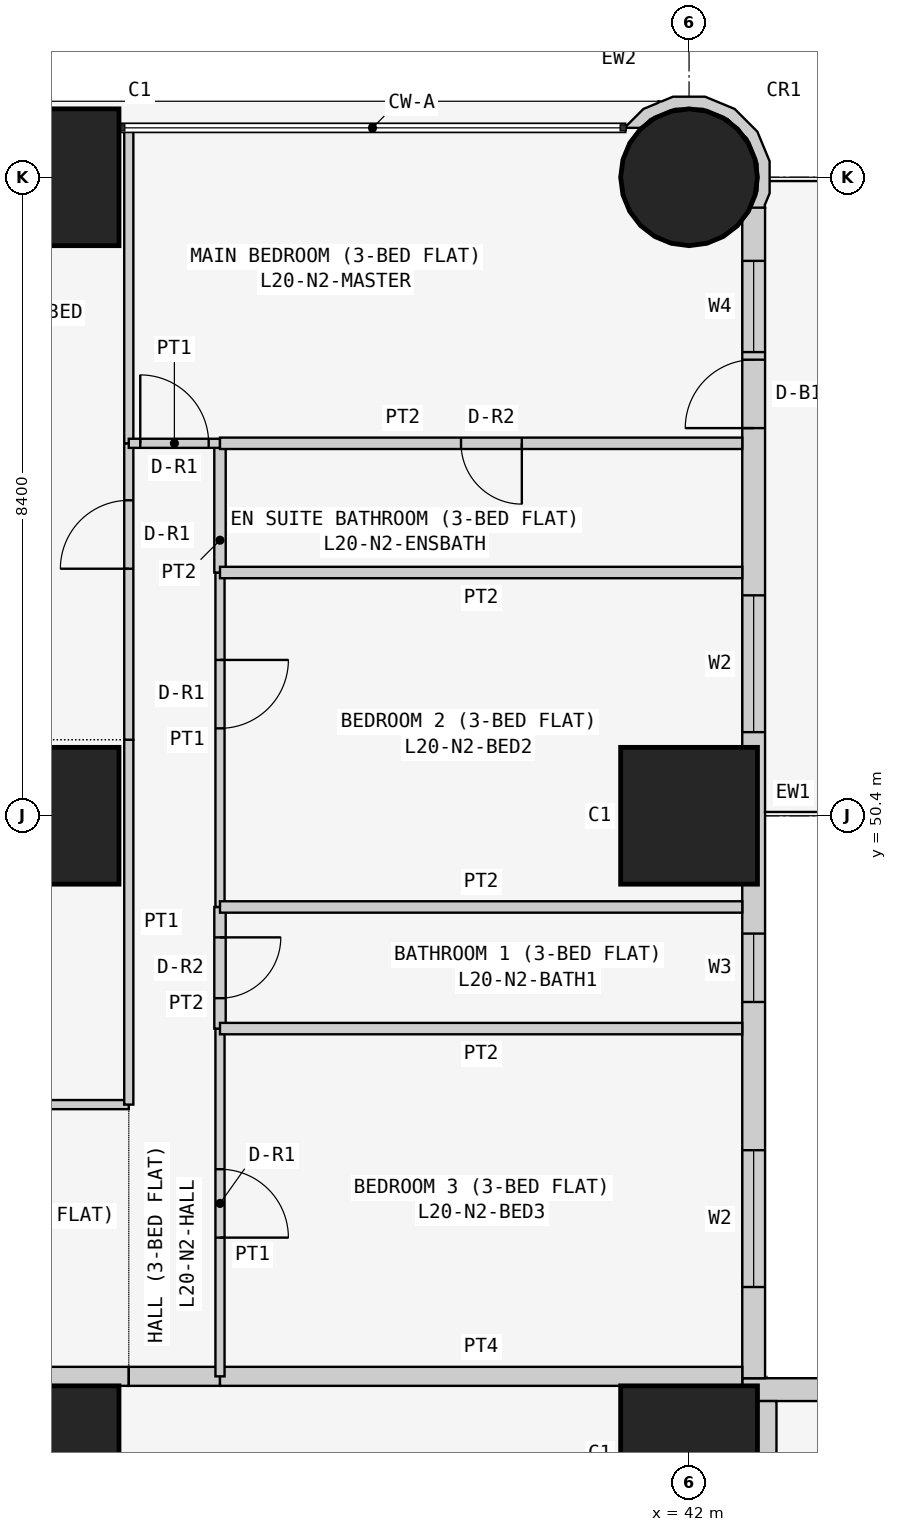
"""IFC4 building model, lengths in metres.
Left out: names, types, materials, properties, quantities, classifications, styles, units other than length and angle.
Written with IfcOpenShell. Run it as: python <this file> out.ifc"""

import sys

from ifc_helpers import new_model, si_unit, direction, frame, frame_2d, origin, origin_2d, place, context, subcontext, project, spatial, polyline, rectangle, circle, outline, extrude, element, fill, save


model = new_model("IFC4")
c1 = context("Model", 3, precision=1e-05, world=origin(), true_north=direction((0.0, 1.0)))
c2 = subcontext(c1, "Body", "Model", "MODEL_VIEW")
j1 = project(units=[si_unit("LENGTHUNIT", "METRE"), si_unit("PLANEANGLEUNIT", "RADIAN")], contexts=[c1])
p1 = place(None, origin())
s1 = spatial("IfcSite", under=j1, at=p1, CompositionType="ELEMENT")
p2 = place(p1, origin())
s2 = spatial("IfcBuilding", under=s1, at=p2, CompositionType="ELEMENT")
p3 = place(p2, frame((0.0, 0.0, 81.3)))
s3 = spatial("IfcBuildingStorey", under=s2, at=p3, CompositionType="ELEMENT", Elevation=81.3)
for number, where, z_axis, x_axis in (
    (1, (33.6, 42.0, 0.0), (0.0, 0.0, 1.0), (1.0, 0.0, 0.0)),
    (2, (33.6, 50.4, 0.0), (0.0, 0.0, 1.0), (1.0, 0.0, 0.0)),
    (3, (33.6, 58.8, 0.0), (0.0, 0.0, 1.0), (1.0, 0.0, 0.0)),
    (4, (42.0, 42.0, 0.0), (0.0, 0.0, 1.0), (1.0, 0.0, 0.0)),
    (5, (42.0, 50.4, 0.0), (0.0, 0.0, 1.0), (1.0, 0.0, 0.0)),
):
    element("IfcColumn", number, at=place(p3, frame(where, z_axis=z_axis, x_axis=x_axis)), inside=s3, PredefinedType="COLUMN", context=c2, shape_type="SweptSolid", body=[
        extrude(rectangle(XDim=1.8, YDim=1.8, at=origin_2d()), origin(), (0.0, 0.0, 1.0), 3.6),
    ])
p4 = place(p3, frame((42.0, 58.8, 0.0), z_axis=(0.0, 0.0, 1.0), x_axis=(1.0, 0.0, 0.0)))
e6 = element("IfcColumn", 6, at=p4, inside=s3, PredefinedType="COLUMN", context=c2, shape_type="SweptSolid", body=[
    extrude(circle(Radius=0.9, at=origin_2d()), origin(), (0.0, 0.0, 1.0), 3.6),
])
p5 = place(p3, frame((58.4, 42.85, 0.0), z_axis=(0.0, 0.0, 1.0), x_axis=(-1.0, 0.0, 0.0)))
e7 = element("IfcWall", 7, at=p5, inside=s3, PredefinedType="SOLIDWALL", context=c2, shape_type="SweptSolid", body=[
    extrude(rectangle(XDim=15.7, YDim=0.3, at=frame_2d((7.85, 0.0))), origin(), (0.0, 0.0, 1.0), 3.45),
])
p6 = place(p5, frame((12.4, 0.0, 0.9)))
e8 = element("IfcOpeningElement", 8, at=p6, cuts=e7, PredefinedType="OPENING", context=c2, shape_type="SweptSolid", body=[
    extrude(rectangle(XDim=1.8, YDim=1.5, at=frame_2d((0.9, 0.75))), frame((0.0, 0.16, 0.0), z_axis=(0.0, -1.0, 0.0), x_axis=(1.0, 0.0, 0.0)), (0.0, 0.0, 1.0), 0.32),
])
p7 = place(p5, frame((9.55, 0.0, 1.5)))
e9 = element("IfcOpeningElement", 9, at=p7, cuts=e7, PredefinedType="OPENING", context=c2, shape_type="SweptSolid", body=[
    extrude(rectangle(XDim=0.9, YDim=0.7, at=frame_2d((0.45, 0.35))), frame((0.0, 0.16, 0.0), z_axis=(0.0, -1.0, 0.0), x_axis=(1.0, 0.0, 0.0)), (0.0, 0.0, 1.0), 0.32),
])
p8 = place(p5, frame((5.1, 0.0, 0.9)))
e10 = element("IfcOpeningElement", 10, at=p8, cuts=e7, PredefinedType="OPENING", context=c2, shape_type="SweptSolid", body=[
    extrude(rectangle(XDim=1.8, YDim=1.5, at=frame_2d((0.9, 0.75))), frame((0.0, 0.16, 0.0), z_axis=(0.0, -1.0, 0.0), x_axis=(1.0, 0.0, 0.0)), (0.0, 0.0, 1.0), 0.32),
])
p9 = place(p5, frame((2.0, 0.0, 0.0)))
e11 = element("IfcOpeningElement", 11, at=p9, cuts=e7, PredefinedType="OPENING", context=c2, shape_type="SweptSolid", body=[
    extrude(rectangle(XDim=0.9, YDim=2.4, at=frame_2d((0.45, 1.2))), frame((0.0, 0.16, 0.0), z_axis=(0.0, -1.0, 0.0), x_axis=(1.0, 0.0, 0.0)), (0.0, 0.0, 1.0), 0.32),
])
p10 = place(p5, frame((0.7, 0.0, 0.9)))
e12 = element("IfcOpeningElement", 12, at=p10, cuts=e7, PredefinedType="OPENING", context=c2, shape_type="SweptSolid", body=[
    extrude(rectangle(XDim=1.2, YDim=1.5, at=frame_2d((0.6, 0.75))), frame((0.0, 0.16, 0.0), z_axis=(0.0, -1.0, 0.0), x_axis=(1.0, 0.0, 0.0)), (0.0, 0.0, 1.0), 0.32),
])
p11 = place(p3, frame((42.85, 43.0, 0.0), z_axis=(0.0, 0.0, 1.0), x_axis=(0.0, 1.0, 0.0)))
e13 = element("IfcWall", 13, at=p11, inside=s3, PredefinedType="SOLIDWALL", context=c2, shape_type="SweptSolid", body=[
    extrude(rectangle(XDim=15.4, YDim=0.3, at=frame_2d((7.7, 0.0))), origin(), (0.0, 0.0, 1.0), 3.45),
])
p12 = place(p11, frame((1.2, 0.0, 0.9)))
e14 = element("IfcOpeningElement", 14, at=p12, cuts=e13, PredefinedType="OPENING", context=c2, shape_type="SweptSolid", body=[
    extrude(rectangle(XDim=1.8, YDim=1.5, at=frame_2d((0.9, 0.75))), frame((0.0, 0.16, 0.0), z_axis=(0.0, -1.0, 0.0), x_axis=(1.0, 0.0, 0.0)), (0.0, 0.0, 1.0), 0.32),
])
p13 = place(p11, frame((4.95, 0.0, 1.5)))
e15 = element("IfcOpeningElement", 15, at=p13, cuts=e13, PredefinedType="OPENING", context=c2, shape_type="SweptSolid", body=[
    extrude(rectangle(XDim=0.9, YDim=0.7, at=frame_2d((0.45, 0.35))), frame((0.0, 0.16, 0.0), z_axis=(0.0, -1.0, 0.0), x_axis=(1.0, 0.0, 0.0)), (0.0, 0.0, 1.0), 0.32),
])
p14 = place(p11, frame((8.5, 0.0, 0.9)))
e16 = element("IfcOpeningElement", 16, at=p14, cuts=e13, PredefinedType="OPENING", context=c2, shape_type="SweptSolid", body=[
    extrude(rectangle(XDim=1.8, YDim=1.5, at=frame_2d((0.9, 0.75))), frame((0.0, 0.16, 0.0), z_axis=(0.0, -1.0, 0.0), x_axis=(1.0, 0.0, 0.0)), (0.0, 0.0, 1.0), 0.32),
])
p15 = place(p11, frame((12.5, 0.0, 0.0)))
e17 = element("IfcOpeningElement", 17, at=p15, cuts=e13, PredefinedType="OPENING", context=c2, shape_type="SweptSolid", body=[
    extrude(rectangle(XDim=0.9, YDim=2.4, at=frame_2d((0.45, 1.2))), frame((0.0, 0.16, 0.0), z_axis=(0.0, -1.0, 0.0), x_axis=(1.0, 0.0, 0.0)), (0.0, 0.0, 1.0), 0.32),
])
p16 = place(p11, frame((13.5, 0.0, 0.9)))
e18 = element("IfcOpeningElement", 18, at=p16, cuts=e13, PredefinedType="OPENING", context=c2, shape_type="SweptSolid", body=[
    extrude(rectangle(XDim=1.2, YDim=1.5, at=frame_2d((0.6, 0.75))), frame((0.0, 0.16, 0.0), z_axis=(0.0, -1.0, 0.0), x_axis=(1.0, 0.0, 0.0)), (0.0, 0.0, 1.0), 0.32),
])
p17 = place(p3, frame((42.91, 58.436, 0.0), z_axis=(0.0, 0.0, 1.0), x_axis=(0.377204953059, 0.926129809145, 0.0)))
e19 = element("IfcWall", 19, at=p17, inside=s3, PredefinedType="SOLIDWALL", context=c2, shape_type="SweptSolid", body=[
    extrude(outline(polyline([(0.769, 1.728), (0.75, 1.723), (0.6, 1.875), (0.295, 2.004), (0.281, 1.998), (0.36, 1.803), (0.509, 1.741), (0.761, 1.486), (0.896, 1.154), (0.894, 0.795), (0.755, 0.465), (0.5, 0.213), (0.168, 0.078), (-0.1, 0.08), (0.001, -0.097), (0.03, -0.08), (0.198, -0.081), (0.589, 0.078), (0.889, 0.374), (1.052, 0.763), (1.055, 1.185), (0.896, 1.575), (0.778, 1.695), (0.769, 1.728)])), origin(), (0.0, 0.0, 1.0), 3.45),
])
p18 = place(p3, frame((29.4, 43.025, 0.0), z_axis=(0.0, 0.0, 1.0), x_axis=(1.0, 0.0, 0.0)))
e20 = element("IfcWall", 20, at=p18, inside=s3, PredefinedType="PARTITIONING", context=c2, shape_type="SweptSolid", body=[
    extrude(rectangle(XDim=5.229, YDim=0.25, at=frame_2d((2.615, 0.0))), origin(), (0.0, 0.0, 1.0), 3.45),
])
p19 = place(p18, frame((2.1, 0.0, 0.0)))
e21 = element("IfcOpeningElement", 21, at=p19, cuts=e20, PredefinedType="OPENING", context=c2, shape_type="SweptSolid", body=[
    extrude(rectangle(XDim=1.0, YDim=2.1, at=frame_2d((0.5, 1.05))), frame((0.0, 0.135, 0.0), z_axis=(0.0, -1.0, 0.0), x_axis=(1.0, 0.0, 0.0)), (0.0, 0.0, 1.0), 0.27),
])
p20 = place(p3, frame((34.629, 43.025, 0.0), z_axis=(0.0, 0.0, 1.0), x_axis=(1.0, 0.0, 0.0)))
e22 = element("IfcWall", 22, at=p20, inside=s3, PredefinedType="PARTITIONING", context=c2, shape_type="SweptSolid", body=[
    extrude(rectangle(XDim=1.2, YDim=0.25, at=frame_2d((0.6, 0.0))), origin(), (0.0, 0.0, 1.0), 3.45),
])
for number, where, z_axis, x_axis in (
    (23, (35.829, 43.025, 0.0), (0.0, 0.0, 1.0), (1.0, 0.0, 0.0)),
    (24, (43.025, 42.7, 0.0), (0.0, 0.0, 1.0), (0.0, -1.0, 0.0)),
):
    element("IfcWall", number, at=place(p3, frame(where, z_axis=z_axis, x_axis=x_axis)), inside=s3, PredefinedType="PARTITIONING", context=c2, shape_type="SweptSolid", body=[
        extrude(rectangle(XDim=6.871, YDim=0.25, at=frame_2d((3.436, 0.0))), origin(), (0.0, 0.0, 1.0), 3.45),
    ])
p21 = place(p3, frame((29.4, 46.6, 0.0), z_axis=(0.0, 0.0, 1.0), x_axis=(1.0, 0.0, 0.0)))
e25 = element("IfcWall", 25, at=p21, inside=s3, PredefinedType="PARTITIONING", context=c2, shape_type="SweptSolid", body=[
    extrude(rectangle(XDim=5.229, YDim=0.12, at=frame_2d((2.615, 0.0))), origin(), (0.0, 0.0, 1.0), 3.45),
])
p22 = place(p21, frame((1.05, 0.0, 0.0)))
e26 = element("IfcOpeningElement", 26, at=p22, cuts=e25, PredefinedType="OPENING", context=c2, shape_type="SweptSolid", body=[
    extrude(rectangle(XDim=0.9, YDim=2.1, at=frame_2d((0.45, 1.05))), frame((0.0, 0.07, 0.0), z_axis=(0.0, -1.0, 0.0), x_axis=(1.0, 0.0, 0.0)), (0.0, 0.0, 1.0), 0.14),
])
p23 = place(p3, frame((34.629, 51.4, 0.0), z_axis=(0.0, 0.0, 1.0), x_axis=(0.0, -1.0, 0.0)))
e27 = element("IfcWall", 27, at=p23, inside=s3, PredefinedType="PARTITIONING", context=c2, shape_type="SweptSolid", body=[
    extrude(rectangle(XDim=4.8, YDim=0.12, at=frame_2d((2.4, 0.0))), origin(), (0.0, 0.0, 1.0), 3.45),
])
p24 = place(p3, frame((34.629, 55.3, 0.0), z_axis=(0.0, 0.0, 1.0), x_axis=(0.0, -1.0, 0.0)))
e28 = element("IfcWall", 28, at=p24, inside=s3, PredefinedType="PARTITIONING", context=c2, shape_type="SweptSolid", body=[
    extrude(rectangle(XDim=3.9, YDim=0.12, at=frame_2d((1.95, 0.0))), origin(), (0.0, 0.0, 1.0), 3.45),
])
p25 = place(p24, frame((0.75, 0.0, 0.0)))
e29 = element("IfcOpeningElement", 29, at=p25, cuts=e28, PredefinedType="OPENING", context=c2, shape_type="SweptSolid", body=[
    extrude(rectangle(XDim=0.9, YDim=2.1, at=frame_2d((0.45, 1.05))), frame((0.0, 0.07, 0.0), z_axis=(0.0, -1.0, 0.0), x_axis=(1.0, 0.0, 0.0)), (0.0, 0.0, 1.0), 0.14),
])
p26 = place(p3, frame((34.629, 59.45, 0.0), z_axis=(0.0, 0.0, 1.0), x_axis=(0.0, -1.0, 0.0)))
e30 = element("IfcWall", 30, at=p26, inside=s3, PredefinedType="PARTITIONING", context=c2, shape_type="SweptSolid", body=[
    extrude(rectangle(XDim=4.15, YDim=0.12, at=frame_2d((2.075, 0.0))), origin(), (0.0, 0.0, 1.0), 3.45),
])
p27 = place(p3, frame((35.829, 47.6, 0.0), z_axis=(0.0, 0.0, 1.0), x_axis=(0.0, -1.0, 0.0)))
e31 = element("IfcWall", 31, at=p27, inside=s3, PredefinedType="PARTITIONING", context=c2, shape_type="SweptSolid", body=[
    extrude(rectangle(XDim=4.575, YDim=0.12, at=frame_2d((2.288, 0.0))), origin(), (0.0, 0.0, 1.0), 3.45),
])
p28 = place(p27, frame((1.85, 0.0, 0.0)))
e32 = element("IfcOpeningElement", 32, at=p28, cuts=e31, PredefinedType="OPENING", context=c2, shape_type="SweptSolid", body=[
    extrude(rectangle(XDim=0.9, YDim=2.1, at=frame_2d((0.45, 1.05))), frame((0.0, 0.07, 0.0), z_axis=(0.0, -1.0, 0.0), x_axis=(1.0, 0.0, 0.0)), (0.0, 0.0, 1.0), 0.14),
])
p29 = place(p3, frame((35.829, 49.2, 0.0), z_axis=(0.0, 0.0, 1.0), x_axis=(0.0, -1.0, 0.0)))
e33 = element("IfcWall", 33, at=p29, inside=s3, PredefinedType="PARTITIONING", context=c2, shape_type="SweptSolid", body=[
    extrude(rectangle(XDim=1.6, YDim=0.15, at=frame_2d((0.8, 0.0))), origin(), (0.0, 0.0, 1.0), 3.45),
])
p30 = place(p29, frame((0.4, 0.0, 0.0)))
e34 = element("IfcOpeningElement", 34, at=p30, cuts=e33, PredefinedType="OPENING", context=c2, shape_type="SweptSolid", body=[
    extrude(rectangle(XDim=0.8, YDim=2.1, at=frame_2d((0.4, 1.05))), frame((0.0, 0.085, 0.0), z_axis=(0.0, -1.0, 0.0), x_axis=(1.0, 0.0, 0.0)), (0.0, 0.0, 1.0), 0.17),
])
p31 = place(p3, frame((35.829, 53.6, 0.0), z_axis=(0.0, 0.0, 1.0), x_axis=(0.0, -1.0, 0.0)))
e35 = element("IfcWall", 35, at=p31, inside=s3, PredefinedType="PARTITIONING", context=c2, shape_type="SweptSolid", body=[
    extrude(rectangle(XDim=4.4, YDim=0.12, at=frame_2d((2.2, 0.0))), origin(), (0.0, 0.0, 1.0), 3.45),
])
p32 = place(p31, frame((1.15, 0.0, 0.0)))
e36 = element("IfcOpeningElement", 36, at=p32, cuts=e35, PredefinedType="OPENING", context=c2, shape_type="SweptSolid", body=[
    extrude(rectangle(XDim=0.9, YDim=2.1, at=frame_2d((0.45, 1.05))), frame((0.0, 0.07, 0.0), z_axis=(0.0, -1.0, 0.0), x_axis=(1.0, 0.0, 0.0)), (0.0, 0.0, 1.0), 0.14),
])
p33 = place(p3, frame((35.829, 55.3, 0.0), z_axis=(0.0, 0.0, 1.0), x_axis=(0.0, -1.0, 0.0)))
e37 = element("IfcWall", 37, at=p33, inside=s3, PredefinedType="PARTITIONING", context=c2, shape_type="SweptSolid", body=[
    extrude(rectangle(XDim=1.7, YDim=0.15, at=frame_2d((0.85, 0.0))), origin(), (0.0, 0.0, 1.0), 3.45),
])
p34 = place(p3, frame((34.629, 55.3, 0.0), z_axis=(0.0, 0.0, 1.0), x_axis=(1.0, 0.0, 0.0)))
e38 = element("IfcWall", 38, at=p34, inside=s3, PredefinedType="PARTITIONING", context=c2, shape_type="SweptSolid", body=[
    extrude(rectangle(XDim=1.2, YDim=0.12, at=frame_2d((0.6, 0.0))), origin(), (0.0, 0.0, 1.0), 3.45),
])
p35 = place(p34, frame((0.151, 0.0, 0.0)))
e39 = element("IfcOpeningElement", 39, at=p35, cuts=e38, PredefinedType="OPENING", context=c2, shape_type="SweptSolid", body=[
    extrude(rectangle(XDim=0.9, YDim=2.1, at=frame_2d((0.45, 1.05))), frame((0.0, 0.07, 0.0), z_axis=(0.0, -1.0, 0.0), x_axis=(1.0, 0.0, 0.0)), (0.0, 0.0, 1.0), 0.14),
])
for number, where, z_axis, x_axis in (
    (40, (35.829, 47.6, 0.0), (0.0, 0.0, 1.0), (1.0, 0.0, 0.0)),
    (41, (35.829, 49.2, 0.0), (0.0, 0.0, 1.0), (1.0, 0.0, 0.0)),
    (42, (35.829, 53.6, 0.0), (0.0, 0.0, 1.0), (1.0, 0.0, 0.0)),
):
    element("IfcWall", number, at=place(p3, frame(where, z_axis=z_axis, x_axis=x_axis)), inside=s3, PredefinedType="PARTITIONING", context=c2, shape_type="SweptSolid", body=[
        extrude(rectangle(XDim=6.871, YDim=0.15, at=frame_2d((3.436, 0.0))), origin(), (0.0, 0.0, 1.0), 3.45),
    ])
p36 = place(p3, frame((35.829, 55.3, 0.0), z_axis=(0.0, 0.0, 1.0), x_axis=(1.0, 0.0, 0.0)))
e43 = element("IfcWall", 43, at=p36, inside=s3, PredefinedType="PARTITIONING", context=c2, shape_type="SweptSolid", body=[
    extrude(rectangle(XDim=6.871, YDim=0.15, at=frame_2d((3.436, 0.0))), origin(), (0.0, 0.0, 1.0), 3.45),
])
p37 = place(p36, frame((3.171, 0.0, 0.0)))
e44 = element("IfcOpeningElement", 44, at=p37, cuts=e43, PredefinedType="OPENING", context=c2, shape_type="SweptSolid", body=[
    extrude(rectangle(XDim=0.8, YDim=2.1, at=frame_2d((0.4, 1.05))), frame((0.0, 0.085, 0.0), z_axis=(0.0, -1.0, 0.0), x_axis=(1.0, 0.0, 0.0)), (0.0, 0.0, 1.0), 0.17),
])
p38 = place(p12, origin())
e45 = element("IfcWindow", 45, at=p38, inside=s3, PartitioningType="SINGLE_PANEL", PredefinedType="WINDOW", context=c2, shape_type="SweptSolid", body=[
    extrude(rectangle(XDim=1.8, YDim=1.5, at=frame_2d((0.9, 0.75))), frame((0.0, 0.03, 0.0), z_axis=(0.0, -1.0, 0.0), x_axis=(1.0, 0.0, 0.0)), (0.0, 0.0, 1.0), 0.06),
])
fill(e14, e45)
p39 = place(p13, origin())
e46 = element("IfcWindow", 46, at=p39, inside=s3, PartitioningType="SINGLE_PANEL", PredefinedType="WINDOW", context=c2, shape_type="SweptSolid", body=[
    extrude(rectangle(XDim=0.9, YDim=0.7, at=frame_2d((0.45, 0.35))), frame((0.0, 0.03, 0.0), z_axis=(0.0, -1.0, 0.0), x_axis=(1.0, 0.0, 0.0)), (0.0, 0.0, 1.0), 0.06),
])
fill(e15, e46)
p40 = place(p14, origin())
e47 = element("IfcWindow", 47, at=p40, inside=s3, PartitioningType="SINGLE_PANEL", PredefinedType="WINDOW", context=c2, shape_type="SweptSolid", body=[
    extrude(rectangle(XDim=1.8, YDim=1.5, at=frame_2d((0.9, 0.75))), frame((0.0, 0.03, 0.0), z_axis=(0.0, -1.0, 0.0), x_axis=(1.0, 0.0, 0.0)), (0.0, 0.0, 1.0), 0.06),
])
fill(e16, e47)
p41 = place(p15, origin())
e48 = element("IfcDoor", 48, at=p41, inside=s3, OperationType="SINGLE_SWING_LEFT", PredefinedType="DOOR", context=c2, shape_type="SweptSolid", body=[
    extrude(rectangle(XDim=0.9, YDim=2.4, at=frame_2d((0.45, 1.2))), frame((0.0, 0.025, 0.0), z_axis=(0.0, -1.0, 0.0), x_axis=(1.0, 0.0, 0.0)), (0.0, 0.0, 1.0), 0.05),
])
fill(e17, e48)
p42 = place(p16, origin())
e49 = element("IfcWindow", 49, at=p42, inside=s3, PartitioningType="SINGLE_PANEL", PredefinedType="WINDOW", context=c2, shape_type="SweptSolid", body=[
    extrude(rectangle(XDim=1.2, YDim=1.5, at=frame_2d((0.6, 0.75))), frame((0.0, 0.03, 0.0), z_axis=(0.0, -1.0, 0.0), x_axis=(1.0, 0.0, 0.0)), (0.0, 0.0, 1.0), 0.06),
])
fill(e18, e49)
p43 = place(p25, frame((0.9, 0.0, 0.0), z_axis=(0.0, 0.0, 1.0), x_axis=(-1.0, 0.0, 0.0)))
e50 = element("IfcDoor", 50, at=p43, inside=s3, OperationType="SINGLE_SWING_LEFT", PredefinedType="DOOR", context=c2, shape_type="SweptSolid", body=[
    extrude(rectangle(XDim=0.9, YDim=2.1, at=frame_2d((0.45, 1.05))), frame((0.0, 0.025, 0.0), z_axis=(0.0, -1.0, 0.0), x_axis=(1.0, 0.0, 0.0)), (0.0, 0.0, 1.0), 0.05),
])
fill(e29, e50)
p44 = place(p28, origin())
e51 = element("IfcDoor", 51, at=p44, inside=s3, OperationType="SINGLE_SWING_RIGHT", PredefinedType="DOOR", context=c2, shape_type="SweptSolid", body=[
    extrude(rectangle(XDim=0.9, YDim=2.1, at=frame_2d((0.45, 1.05))), frame((0.0, 0.025, 0.0), z_axis=(0.0, -1.0, 0.0), x_axis=(1.0, 0.0, 0.0)), (0.0, 0.0, 1.0), 0.05),
])
fill(e32, e51)
p45 = place(p30, origin())
e52 = element("IfcDoor", 52, at=p45, inside=s3, OperationType="SINGLE_SWING_LEFT", PredefinedType="DOOR", context=c2, shape_type="SweptSolid", body=[
    extrude(rectangle(XDim=0.8, YDim=2.1, at=frame_2d((0.4, 1.05))), frame((0.0, 0.025, 0.0), z_axis=(0.0, -1.0, 0.0), x_axis=(1.0, 0.0, 0.0)), (0.0, 0.0, 1.0), 0.05),
])
fill(e34, e52)
p46 = place(p32, origin())
e53 = element("IfcDoor", 53, at=p46, inside=s3, OperationType="SINGLE_SWING_LEFT", PredefinedType="DOOR", context=c2, shape_type="SweptSolid", body=[
    extrude(rectangle(XDim=0.9, YDim=2.1, at=frame_2d((0.45, 1.05))), frame((0.0, 0.025, 0.0), z_axis=(0.0, -1.0, 0.0), x_axis=(1.0, 0.0, 0.0)), (0.0, 0.0, 1.0), 0.05),
])
fill(e36, e53)
p47 = place(p35, origin())
e54 = element("IfcDoor", 54, at=p47, inside=s3, OperationType="SINGLE_SWING_LEFT", PredefinedType="DOOR", context=c2, shape_type="SweptSolid", body=[
    extrude(rectangle(XDim=0.9, YDim=2.1, at=frame_2d((0.45, 1.05))), frame((0.0, 0.025, 0.0), z_axis=(0.0, -1.0, 0.0), x_axis=(1.0, 0.0, 0.0)), (0.0, 0.0, 1.0), 0.05),
])
fill(e39, e54)
p48 = place(p37, frame((0.8, 0.0, 0.0), z_axis=(0.0, 0.0, 1.0), x_axis=(-1.0, 0.0, 0.0)))
e55 = element("IfcDoor", 55, at=p48, inside=s3, OperationType="SINGLE_SWING_LEFT", PredefinedType="DOOR", context=c2, shape_type="SweptSolid", body=[
    extrude(rectangle(XDim=0.8, YDim=2.1, at=frame_2d((0.4, 1.05))), frame((0.0, 0.025, 0.0), z_axis=(0.0, -1.0, 0.0), x_axis=(1.0, 0.0, 0.0)), (0.0, 0.0, 1.0), 0.05),
])
fill(e44, e55)
save(model, sys.argv[1])
